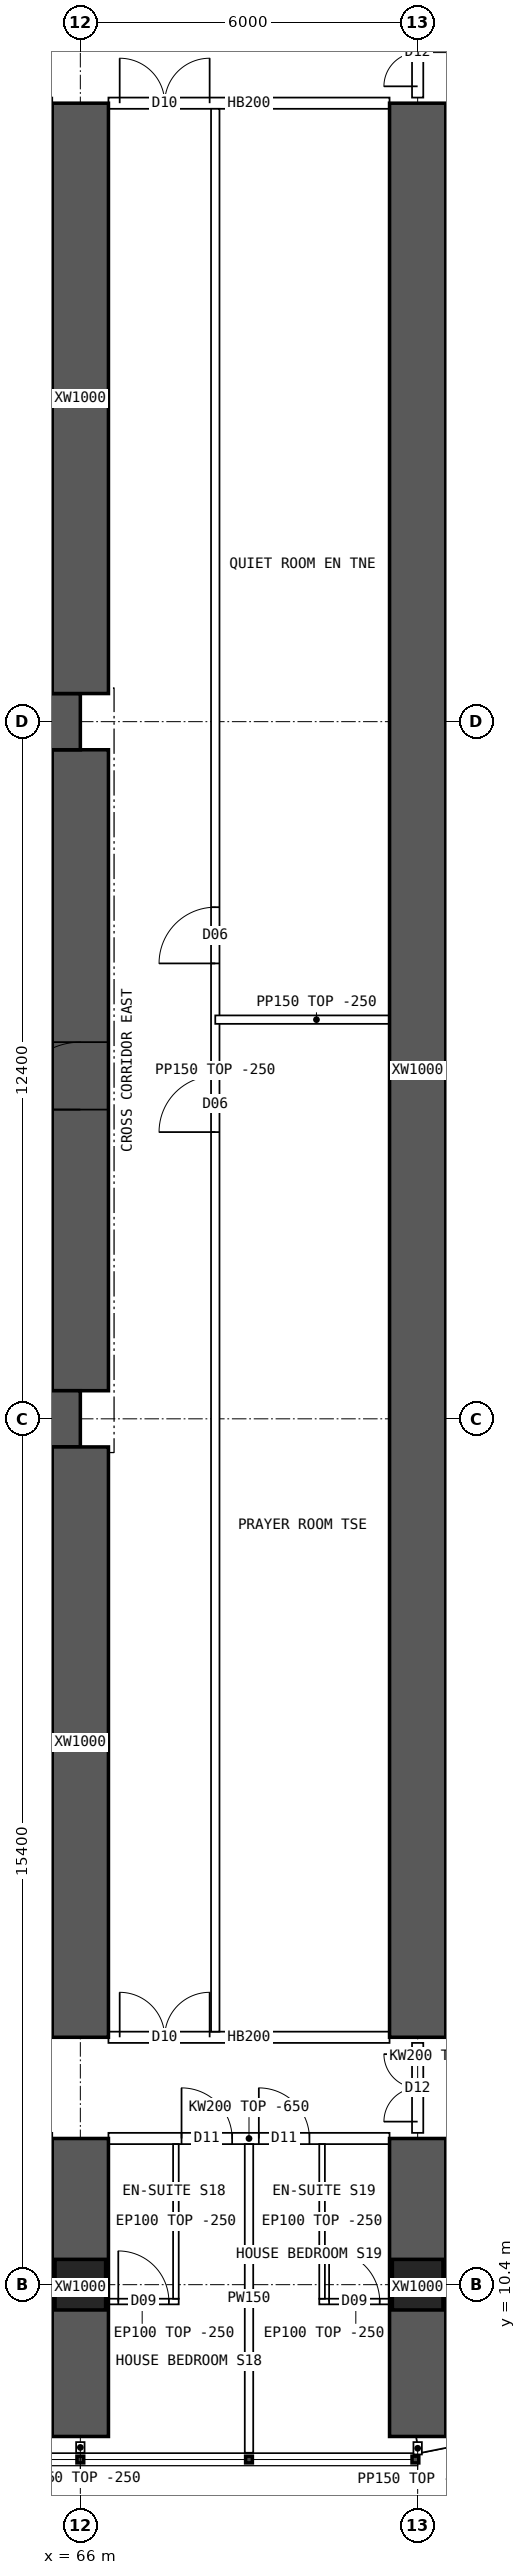
"""IFC4 building model, lengths in metres.
Left out: names, types, materials, properties, quantities, classifications, styles, units other than length and angle.
Written with IfcOpenShell. Run it as: python <this file> out.ifc"""

import sys

from ifc_helpers import new_model, si_unit, direction, frame, frame_2d, origin, origin_2d, place, context, subcontext, project, spatial, polyline, rectangle, hollow_rectangle, outline, extrude, element, fill, save


model = new_model("IFC4")
c1 = context("Model", 3, precision=1e-05, world=origin(), true_north=direction((0.0, 1.0)))
c2 = subcontext(c1, "Body", "Model", "MODEL_VIEW")
j1 = project(units=[si_unit("LENGTHUNIT", "METRE"), si_unit("PLANEANGLEUNIT", "RADIAN")], contexts=[c1])
p1 = place(None, origin())
s1 = spatial("IfcSite", under=j1, at=p1, CompositionType="ELEMENT")
p2 = place(p1, origin())
s2 = spatial("IfcBuilding", under=s1, at=p2, CompositionType="ELEMENT")
p3 = place(p2, frame((0.0, 0.0, 46.45)))
s3 = spatial("IfcBuildingStorey", under=s2, at=p3, CompositionType="ELEMENT", Elevation=46.45)
for number, where, z_axis, x_axis in (
    (1, (66.0, 10.4, 0.0), (0.0, 0.0, 1.0), (1.0, 0.0, 0.0)),
    (2, (72.0, 10.4, 0.0), (0.0, 0.0, 1.0), (1.0, 0.0, 0.0)),
):
    element("IfcColumn", number, at=place(p3, frame(where, z_axis=z_axis, x_axis=x_axis)), inside=s3, PredefinedType="COLUMN", context=c2, shape_type="SweptSolid", body=[
        extrude(hollow_rectangle(XDim=0.9, YDim=0.9, WallThickness=0.09, at=origin_2d()), origin(), (0.0, 0.0, 1.0), 3.75),
    ])
for number, where, z_axis, x_axis in (
    (3, (18.0, 25.8, 0.0), (0.0, 0.0, 1.0), (1.0, 0.0, 0.0)),
    (4, (18.0, 38.2, 0.0), (0.0, 0.0, 1.0), (1.0, 0.0, 0.0)),
):
    element("IfcWall", number, at=place(p3, frame(where, z_axis=z_axis, x_axis=x_axis)), inside=s3, PredefinedType="SHEAR", context=c2, shape_type="SweptSolid", body=[
        extrude(rectangle(XDim=48.0, YDim=1.0, at=frame_2d((24.0, 0.0))), origin(), (0.0, 0.0, 1.0), 3.75),
    ])
p4 = place(p3, frame((66.0, 26.3, 0.0), z_axis=(0.0, 0.0, 1.0), x_axis=(0.0, 1.0, 0.0)))
e5 = element("IfcWall", 5, at=p4, inside=s3, PredefinedType="SHEAR", context=c2, shape_type="SweptSolid", body=[
    extrude(rectangle(XDim=11.4, YDim=1.0, at=frame_2d((5.7, 0.0))), origin(), (0.0, 0.0, 1.0), 3.75),
])
p5 = place(p4, frame((5.0, 0.0, 0.0)))
e6 = element("IfcOpeningElement", 6, at=p5, cuts=e5, PredefinedType="OPENING", context=c2, shape_type="SweptSolid", body=[
    extrude(rectangle(XDim=1.2, YDim=2.1, at=frame_2d((0.6, 1.05))), frame((0.0, 0.51, 0.0), z_axis=(0.0, -1.0, 0.0), x_axis=(1.0, 0.0, 0.0)), (0.0, 0.0, 1.0), 1.02),
])
p6 = place(p3, frame((66.0, 7.7, 0.0), z_axis=(0.0, 0.0, 1.0), x_axis=(0.0, 1.0, 0.0)))
e7 = element("IfcWall", 7, at=p6, inside=s3, PredefinedType="SHEAR", context=c2, shape_type="SweptSolid", body=[
    extrude(rectangle(XDim=5.3, YDim=1.0, at=frame_2d((2.65, 0.0))), origin(), (0.0, 0.0, 1.0), 3.75),
])
for number, where, z_axis, x_axis in (
    (8, (66.0, 14.8, 0.0), (0.0, 0.0, 1.0), (0.0, 1.0, 0.0)),
    (9, (66.0, 38.7, 0.0), (0.0, 0.0, 1.0), (0.0, 1.0, 0.0)),
):
    element("IfcWall", number, at=place(p3, frame(where, z_axis=z_axis, x_axis=x_axis)), inside=s3, PredefinedType="SHEAR", context=c2, shape_type="SweptSolid", body=[
        extrude(rectangle(XDim=10.5, YDim=1.0, at=frame_2d((5.25, 0.0))), origin(), (0.0, 0.0, 1.0), 3.75),
    ])
p7 = place(p3, frame((72.0, 7.7, 0.0), z_axis=(0.0, 0.0, 1.0), x_axis=(0.0, 1.0, 0.0)))
e10 = element("IfcWall", 10, at=p7, inside=s3, PredefinedType="SHEAR", context=c2, shape_type="SweptSolid", body=[
    extrude(rectangle(XDim=5.3, YDim=1.0, at=frame_2d((2.65, 0.0))), origin(), (0.0, 0.0, 1.0), 3.75),
])
p8 = place(p3, frame((72.0, 14.8, 0.0), z_axis=(0.0, 0.0, 1.0), x_axis=(0.0, 1.0, 0.0)))
e11 = element("IfcWall", 11, at=p8, inside=s3, PredefinedType="SHEAR", context=c2, shape_type="SweptSolid", body=[
    extrude(rectangle(XDim=34.4, YDim=1.0, at=frame_2d((17.2, 0.0))), origin(), (0.0, 0.0, 1.0), 3.75),
])
p9 = place(p3, frame((72.0, 7.55, 0.0), z_axis=(0.0, 0.0, 1.0), x_axis=(0.980787251524, 0.195080412259, 0.0)))
e12 = element("IfcWall", 12, at=p9, inside=s3, PredefinedType="SOLIDWALL", context=c2, shape_type="SweptSolid", body=[
    extrude(outline(polyline([(-0.03, -0.15), (3.249, -0.15), (3.189, 0.15), (0.03, 0.15), (-0.03, -0.15)])), origin(), (0.0, 0.0, 1.0), 3.5),
])
p10 = place(p9, frame((0.909, 0.0, 0.9)))
e13 = element("IfcOpeningElement", 13, at=p10, cuts=e12, PredefinedType="OPENING", context=c2, shape_type="SweptSolid", body=[
    extrude(rectangle(XDim=1.4, YDim=1.8, at=frame_2d((0.7, 0.9))), frame((0.0, 0.16, 0.0), z_axis=(0.0, -1.0, 0.0), x_axis=(1.0, 0.0, 0.0)), (0.0, 0.0, 1.0), 0.32),
])
p11 = place(p3, frame((66.5, 13.0, 0.0), z_axis=(0.0, 0.0, 1.0), x_axis=(1.0, 0.0, 0.0)))
e14 = element("IfcWall", 14, at=p11, inside=s3, PredefinedType="SOLIDWALL", context=c2, shape_type="SweptSolid", body=[
    extrude(outline(polyline([(0.0, 0.0), (5.0, 0.0), (5.0, 3.1), (0.0, 3.1), (0.0, 0.0)])), frame((0.0, 0.1, 0.0), z_axis=(0.0, -1.0, 0.0), x_axis=(1.0, 0.0, 0.0)), (0.0, 0.0, 1.0), 0.2),
])
p12 = place(p11, frame((1.3, 0.0, 0.0)))
e15 = element("IfcOpeningElement", 15, at=p12, cuts=e14, PredefinedType="OPENING", context=c2, shape_type="SweptSolid", body=[
    extrude(rectangle(XDim=0.9, YDim=2.1, at=frame_2d((0.45, 1.05))), frame((0.0, 0.11, 0.0), z_axis=(0.0, -1.0, 0.0), x_axis=(1.0, 0.0, 0.0)), (0.0, 0.0, 1.0), 0.22),
])
p13 = place(p11, frame((2.675, 0.0, 0.0)))
e16 = element("IfcOpeningElement", 16, at=p13, cuts=e14, PredefinedType="OPENING", context=c2, shape_type="SweptSolid", body=[
    extrude(rectangle(XDim=0.9, YDim=2.1, at=frame_2d((0.45, 1.05))), frame((0.0, 0.11, 0.0), z_axis=(0.0, -1.0, 0.0), x_axis=(1.0, 0.0, 0.0)), (0.0, 0.0, 1.0), 0.22),
])
p14 = place(p3, frame((66.5, 14.8, 0.0), z_axis=(0.0, 0.0, 1.0), x_axis=(1.0, 0.0, 0.0)))
e17 = element("IfcWall", 17, at=p14, inside=s3, PredefinedType="SOLIDWALL", context=c2, shape_type="SweptSolid", body=[
    extrude(rectangle(XDim=5.0, YDim=0.2, at=frame_2d((2.5, 0.0))), origin(), (0.0, 0.0, 1.0), 3.5),
])
p15 = place(p14, frame((0.2, 0.0, 0.0)))
e18 = element("IfcOpeningElement", 18, at=p15, cuts=e17, PredefinedType="OPENING", context=c2, shape_type="SweptSolid", body=[
    extrude(rectangle(XDim=1.6, YDim=2.1, at=frame_2d((0.8, 1.05))), frame((0.0, 0.11, 0.0), z_axis=(0.0, -1.0, 0.0), x_axis=(1.0, 0.0, 0.0)), (0.0, 0.0, 1.0), 0.22),
])
p16 = place(p3, frame((66.5, 49.2, 0.0), z_axis=(0.0, 0.0, 1.0), x_axis=(1.0, 0.0, 0.0)))
e19 = element("IfcWall", 19, at=p16, inside=s3, PredefinedType="SOLIDWALL", context=c2, shape_type="SweptSolid", body=[
    extrude(rectangle(XDim=5.0, YDim=0.2, at=frame_2d((2.5, 0.0))), origin(), (0.0, 0.0, 1.0), 3.5),
])
p17 = place(p16, frame((0.2, 0.0, 0.0)))
e20 = element("IfcOpeningElement", 20, at=p17, cuts=e19, PredefinedType="OPENING", context=c2, shape_type="SweptSolid", body=[
    extrude(rectangle(XDim=1.6, YDim=2.1, at=frame_2d((0.8, 1.05))), frame((0.0, 0.11, 0.0), z_axis=(0.0, -1.0, 0.0), x_axis=(1.0, 0.0, 0.0)), (0.0, 0.0, 1.0), 0.22),
])
p18 = place(p3, frame((69.0, 7.41, 0.0), z_axis=(0.0, 0.0, 1.0), x_axis=(0.0, 1.0, 0.0)))
e21 = element("IfcWall", 21, at=p18, inside=s3, PredefinedType="PARTITIONING", context=c2, shape_type="SweptSolid", body=[
    extrude(outline(polyline([(0.0, 0.0), (5.49, 0.0), (5.49, 3.1), (5.442, 3.1), (5.44, 3.5), (3.192, 3.5), (3.19, 3.1), (2.792, 3.1), (2.79, 3.5), (0.0, 3.5), (0.0, 0.0)])), frame((0.0, 0.075, 0.0), z_axis=(0.0, -1.0, 0.0), x_axis=(1.0, 0.0, 0.0)), (0.0, 0.0, 1.0), 0.15),
])
p19 = place(p3, frame((67.75, 10.1, 0.0), z_axis=(0.0, 0.0, 1.0), x_axis=(-1.0, 0.0, 0.0)))
e22 = element("IfcWall", 22, at=p19, inside=s3, PredefinedType="PARTITIONING", context=c2, shape_type="SweptSolid", body=[
    extrude(rectangle(XDim=1.3, YDim=0.1, at=frame_2d((0.65, 0.0))), origin(), (0.0, 0.0, 1.0), 3.5),
])
p20 = place(p19, frame((0.175, 0.0, 0.0)))
e23 = element("IfcOpeningElement", 23, at=p20, cuts=e22, PredefinedType="OPENING", context=c2, shape_type="SweptSolid", body=[
    extrude(rectangle(XDim=0.9, YDim=2.1, at=frame_2d((0.45, 1.05))), frame((0.0, 0.06, 0.0), z_axis=(0.0, -1.0, 0.0), x_axis=(1.0, 0.0, 0.0)), (0.0, 0.0, 1.0), 0.12),
])
p21 = place(p3, frame((67.7, 10.15, 0.0), z_axis=(0.0, 0.0, 1.0), x_axis=(0.0, 1.0, 0.0)))
e24 = element("IfcWall", 24, at=p21, inside=s3, PredefinedType="PARTITIONING", context=c2, shape_type="SweptSolid", body=[
    extrude(outline(polyline([(0.0, 0.0), (2.75, 0.0), (2.75, 3.1), (2.702, 3.1), (2.7, 3.5), (0.452, 3.5), (0.45, 3.1), (0.052, 3.1), (0.05, 3.5), (0.0, 3.5), (0.0, 0.0)])), frame((0.0, 0.05, 0.0), z_axis=(0.0, -1.0, 0.0), x_axis=(1.0, 0.0, 0.0)), (0.0, 0.0, 1.0), 0.1),
])
p22 = place(p3, frame((71.55, 10.1, 0.0), z_axis=(0.0, 0.0, 1.0), x_axis=(-1.0, 0.0, 0.0)))
e25 = element("IfcWall", 25, at=p22, inside=s3, PredefinedType="PARTITIONING", context=c2, shape_type="SweptSolid", body=[
    extrude(rectangle(XDim=1.3, YDim=0.1, at=frame_2d((0.65, 0.0))), origin(), (0.0, 0.0, 1.0), 3.5),
])
p23 = place(p22, frame((0.225, 0.0, 0.0)))
e26 = element("IfcOpeningElement", 26, at=p23, cuts=e25, PredefinedType="OPENING", context=c2, shape_type="SweptSolid", body=[
    extrude(rectangle(XDim=0.9, YDim=2.1, at=frame_2d((0.45, 1.05))), frame((0.0, 0.06, 0.0), z_axis=(0.0, -1.0, 0.0), x_axis=(1.0, 0.0, 0.0)), (0.0, 0.0, 1.0), 0.12),
])
p24 = place(p3, frame((70.3, 10.15, 0.0), z_axis=(0.0, 0.0, 1.0), x_axis=(0.0, 1.0, 0.0)))
e27 = element("IfcWall", 27, at=p24, inside=s3, PredefinedType="PARTITIONING", context=c2, shape_type="SweptSolid", body=[
    extrude(outline(polyline([(0.0, 0.0), (2.75, 0.0), (2.75, 3.1), (2.702, 3.1), (2.7, 3.5), (0.452, 3.5), (0.45, 3.1), (0.052, 3.1), (0.05, 3.5), (0.0, 3.5), (0.0, 0.0)])), frame((0.0, 0.05, 0.0), z_axis=(0.0, -1.0, 0.0), x_axis=(1.0, 0.0, 0.0)), (0.0, 0.0, 1.0), 0.1),
])
p25 = place(p3, frame((68.4, 14.9, 0.0), z_axis=(0.0, 0.0, 1.0), x_axis=(0.0, 1.0, 0.0)))
e28 = element("IfcWall", 28, at=p25, inside=s3, PredefinedType="PARTITIONING", context=c2, shape_type="SweptSolid", body=[
    extrude(rectangle(XDim=34.2, YDim=0.15, at=frame_2d((17.1, 0.0))), origin(), (0.0, 0.0, 1.0), 3.5),
])
p26 = place(p25, frame((16.0, 0.0, 0.0)))
e29 = element("IfcOpeningElement", 29, at=p26, cuts=e28, PredefinedType="OPENING", context=c2, shape_type="SweptSolid", body=[
    extrude(rectangle(XDim=1.0, YDim=2.1, at=frame_2d((0.5, 1.05))), frame((0.0, 0.085, 0.0), z_axis=(0.0, -1.0, 0.0), x_axis=(1.0, 0.0, 0.0)), (0.0, 0.0, 1.0), 0.17),
])
p27 = place(p25, frame((19.0, 0.0, 0.0)))
e30 = element("IfcOpeningElement", 30, at=p27, cuts=e28, PredefinedType="OPENING", context=c2, shape_type="SweptSolid", body=[
    extrude(rectangle(XDim=1.0, YDim=2.1, at=frame_2d((0.5, 1.05))), frame((0.0, 0.085, 0.0), z_axis=(0.0, -1.0, 0.0), x_axis=(1.0, 0.0, 0.0)), (0.0, 0.0, 1.0), 0.17),
])
p28 = place(p3, frame((68.4, 32.9, 0.0), z_axis=(0.0, 0.0, 1.0), x_axis=(1.0, 0.0, 0.0)))
e31 = element("IfcWall", 31, at=p28, inside=s3, PredefinedType="PARTITIONING", context=c2, shape_type="SweptSolid", body=[
    extrude(rectangle(XDim=3.6, YDim=0.15, at=frame_2d((1.8, 0.0))), origin(), (0.0, 0.0, 1.0), 3.5),
])
p29 = place(p3, frame((72.075, 30.85, 0.0), z_axis=(0.0, 0.0, 1.0), x_axis=(1.0, 0.0, 0.0)))
e32 = element("IfcWall", 32, at=p29, inside=s3, PredefinedType="PARTITIONING", context=c2, shape_type="SweptSolid", body=[
    extrude(outline(polyline([(0.0, 0.0), (8.02, 0.0), (8.02, 3.5), (6.227, 3.5), (6.225, 3.05), (5.627, 3.05), (5.625, 3.5), (0.0, 3.5), (0.0, 0.0)])), frame((0.0, 0.075, 0.0), z_axis=(0.0, -1.0, 0.0), x_axis=(1.0, 0.0, 0.0)), (0.0, 0.0, 1.0), 0.15),
])
p30 = place(p3, frame((72.0, 13.1, 0.0), z_axis=(0.0, 0.0, 1.0), x_axis=(0.0, 1.0, 0.0)))
e33 = element("IfcWall", 33, at=p30, inside=s3, PredefinedType="SOLIDWALL", context=c2, shape_type="SweptSolid", body=[
    extrude(outline(polyline([(0.0, 0.0), (1.6, 0.0), (1.6, 3.05), (0.0, 3.05), (0.0, 0.0)])), frame((0.0, 0.1, 0.0), z_axis=(0.0, -1.0, 0.0), x_axis=(1.0, 0.0, 0.0)), (0.0, 0.0, 1.0), 0.2),
])
p31 = place(p30, frame((0.2, 0.0, 0.0)))
e34 = element("IfcOpeningElement", 34, at=p31, cuts=e33, PredefinedType="OPENING", context=c2, shape_type="SweptSolid", body=[
    extrude(rectangle(XDim=1.2, YDim=2.1, at=frame_2d((0.6, 1.05))), frame((0.0, 0.11, 0.0), z_axis=(0.0, -1.0, 0.0), x_axis=(1.0, 0.0, 0.0)), (0.0, 0.0, 1.0), 0.22),
])
p32 = place(p3, frame((72.0, 49.3, 0.0), z_axis=(0.0, 0.0, 1.0), x_axis=(0.0, 1.0, 0.0)))
e35 = element("IfcWall", 35, at=p32, inside=s3, PredefinedType="SOLIDWALL", context=c2, shape_type="SweptSolid", body=[
    extrude(outline(polyline([(0.0, 0.0), (1.6, 0.0), (1.6, 3.05), (0.0, 3.05), (0.0, 0.0)])), frame((0.0, 0.1, 0.0), z_axis=(0.0, -1.0, 0.0), x_axis=(1.0, 0.0, 0.0)), (0.0, 0.0, 1.0), 0.2),
])
p33 = place(p32, frame((0.2, 0.0, 0.0)))
e36 = element("IfcOpeningElement", 36, at=p33, cuts=e35, PredefinedType="OPENING", context=c2, shape_type="SweptSolid", body=[
    extrude(rectangle(XDim=1.2, YDim=2.1, at=frame_2d((0.6, 1.05))), frame((0.0, 0.11, 0.0), z_axis=(0.0, -1.0, 0.0), x_axis=(1.0, 0.0, 0.0)), (0.0, 0.0, 1.0), 0.22),
])
p34 = place(p3, frame((66.0, 7.6, 0.0), z_axis=(0.0, 0.0, 1.0), x_axis=(0.0, -1.0, 0.0)))
e37 = element("IfcWall", 37, at=p34, inside=s3, PredefinedType="PARTITIONING", context=c2, shape_type="SweptSolid", body=[
    extrude(rectangle(XDim=0.19, YDim=0.15, at=frame_2d((0.095, 0.0))), origin(), (0.0, 0.0, 1.0), 3.5),
])
p35 = place(p3, frame((72.0, 7.6, 0.0), z_axis=(0.0, 0.0, 1.0), x_axis=(0.0, -1.0, 0.0)))
e38 = element("IfcWall", 38, at=p35, inside=s3, PredefinedType="PARTITIONING", context=c2, shape_type="SweptSolid", body=[
    extrude(rectangle(XDim=0.22, YDim=0.15, at=frame_2d((0.11, 0.0))), origin(), (0.0, 0.0, 1.0), 3.5),
])
p36 = place(p5, origin())
e39 = element("IfcDoor", 39, at=p36, inside=s3, OperationType="SINGLE_SWING_LEFT", PredefinedType="DOOR", context=c2, shape_type="SweptSolid", body=[
    extrude(rectangle(XDim=1.2, YDim=2.1, at=frame_2d((0.6, 1.05))), frame((0.0, 0.025, 0.0), z_axis=(0.0, -1.0, 0.0), x_axis=(1.0, 0.0, 0.0)), (0.0, 0.0, 1.0), 0.05),
])
fill(e6, e39)
p37 = place(p15, origin())
e40 = element("IfcDoor", 40, at=p37, inside=s3, OperationType="DOUBLE_DOOR_SINGLE_SWING", PredefinedType="DOOR", context=c2, shape_type="SweptSolid", body=[
    extrude(rectangle(XDim=1.6, YDim=2.1, at=frame_2d((0.8, 1.05))), frame((0.0, 0.025, 0.0), z_axis=(0.0, -1.0, 0.0), x_axis=(1.0, 0.0, 0.0)), (0.0, 0.0, 1.0), 0.05),
])
fill(e18, e40)
p38 = place(p17, origin())
e41 = element("IfcDoor", 41, at=p38, inside=s3, OperationType="DOUBLE_DOOR_SINGLE_SWING", PredefinedType="DOOR", context=c2, shape_type="SweptSolid", body=[
    extrude(rectangle(XDim=1.6, YDim=2.1, at=frame_2d((0.8, 1.05))), frame((0.0, 0.025, 0.0), z_axis=(0.0, -1.0, 0.0), x_axis=(1.0, 0.0, 0.0)), (0.0, 0.0, 1.0), 0.05),
])
fill(e20, e41)
p39 = place(p20, origin())
e42 = element("IfcDoor", 42, at=p39, inside=s3, OperationType="SINGLE_SWING_RIGHT", PredefinedType="DOOR", context=c2, shape_type="SweptSolid", body=[
    extrude(rectangle(XDim=0.9, YDim=2.1, at=frame_2d((0.45, 1.05))), frame((0.0, 0.025, 0.0), z_axis=(0.0, -1.0, 0.0), x_axis=(1.0, 0.0, 0.0)), (0.0, 0.0, 1.0), 0.05),
])
fill(e23, e42)
p40 = place(p12, origin())
e43 = element("IfcDoor", 43, at=p40, inside=s3, OperationType="SINGLE_SWING_LEFT", PredefinedType="DOOR", context=c2, shape_type="SweptSolid", body=[
    extrude(rectangle(XDim=0.9, YDim=2.1, at=frame_2d((0.45, 1.05))), frame((0.0, 0.025, 0.0), z_axis=(0.0, -1.0, 0.0), x_axis=(1.0, 0.0, 0.0)), (0.0, 0.0, 1.0), 0.05),
])
fill(e15, e43)
p41 = place(p23, origin())
e44 = element("IfcDoor", 44, at=p41, inside=s3, OperationType="SINGLE_SWING_RIGHT", PredefinedType="DOOR", context=c2, shape_type="SweptSolid", body=[
    extrude(rectangle(XDim=0.9, YDim=2.1, at=frame_2d((0.45, 1.05))), frame((0.0, 0.025, 0.0), z_axis=(0.0, -1.0, 0.0), x_axis=(1.0, 0.0, 0.0)), (0.0, 0.0, 1.0), 0.05),
])
fill(e26, e44)
p42 = place(p13, origin())
e45 = element("IfcDoor", 45, at=p42, inside=s3, OperationType="SINGLE_SWING_LEFT", PredefinedType="DOOR", context=c2, shape_type="SweptSolid", body=[
    extrude(rectangle(XDim=0.9, YDim=2.1, at=frame_2d((0.45, 1.05))), frame((0.0, 0.025, 0.0), z_axis=(0.0, -1.0, 0.0), x_axis=(1.0, 0.0, 0.0)), (0.0, 0.0, 1.0), 0.05),
])
fill(e16, e45)
p43 = place(p26, origin())
e46 = element("IfcDoor", 46, at=p43, inside=s3, OperationType="SINGLE_SWING_LEFT", PredefinedType="DOOR", context=c2, shape_type="SweptSolid", body=[
    extrude(rectangle(XDim=1.0, YDim=2.1, at=frame_2d((0.5, 1.05))), frame((0.0, 0.025, 0.0), z_axis=(0.0, -1.0, 0.0), x_axis=(1.0, 0.0, 0.0)), (0.0, 0.0, 1.0), 0.05),
])
fill(e29, e46)
p44 = place(p27, origin())
e47 = element("IfcDoor", 47, at=p44, inside=s3, OperationType="SINGLE_SWING_LEFT", PredefinedType="DOOR", context=c2, shape_type="SweptSolid", body=[
    extrude(rectangle(XDim=1.0, YDim=2.1, at=frame_2d((0.5, 1.05))), frame((0.0, 0.025, 0.0), z_axis=(0.0, -1.0, 0.0), x_axis=(1.0, 0.0, 0.0)), (0.0, 0.0, 1.0), 0.05),
])
fill(e30, e47)
p45 = place(p31, origin())
e48 = element("IfcDoor", 48, at=p45, inside=s3, OperationType="DOUBLE_DOOR_SINGLE_SWING", PredefinedType="DOOR", context=c2, shape_type="SweptSolid", body=[
    extrude(rectangle(XDim=1.2, YDim=2.1, at=frame_2d((0.6, 1.05))), frame((0.0, 0.025, 0.0), z_axis=(0.0, -1.0, 0.0), x_axis=(1.0, 0.0, 0.0)), (0.0, 0.0, 1.0), 0.05),
])
fill(e34, e48)
p46 = place(p33, origin())
e49 = element("IfcDoor", 49, at=p46, inside=s3, OperationType="DOUBLE_DOOR_SINGLE_SWING", PredefinedType="DOOR", context=c2, shape_type="SweptSolid", body=[
    extrude(rectangle(XDim=1.2, YDim=2.1, at=frame_2d((0.6, 1.05))), frame((0.0, 0.025, 0.0), z_axis=(0.0, -1.0, 0.0), x_axis=(1.0, 0.0, 0.0)), (0.0, 0.0, 1.0), 0.05),
])
fill(e36, e49)
save(model, sys.argv[1])
